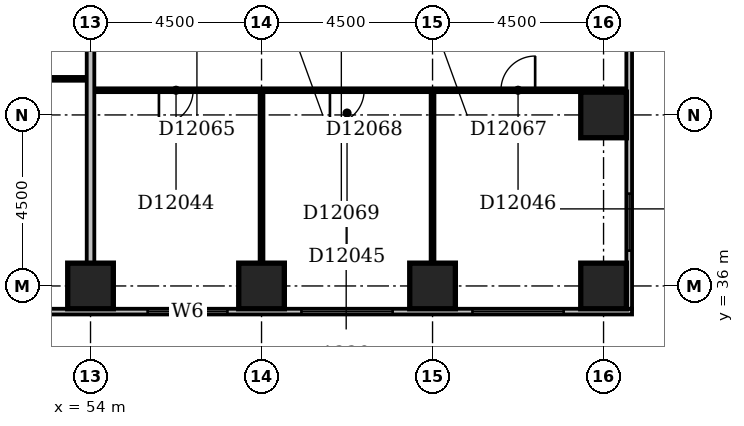
"""IFC4 building model, lengths in metres.
Left out: names, types, materials, properties, quantities, classifications, styles, units other than length and angle.
Written with IfcOpenShell. Run it as: python <this file> out.ifc"""

import sys

from ifc_helpers import new_model, si_unit, direction, frame, frame_2d, origin, origin_2d, place, context, subcontext, project, spatial, rectangle, extrude, element, fill, save


model = new_model("IFC4")
c1 = context("Model", 3, precision=1e-05, world=origin(), true_north=direction((0.0, 1.0)))
c2 = subcontext(c1, "Body", "Model", "MODEL_VIEW")
j1 = project(units=[si_unit("LENGTHUNIT", "METRE"), si_unit("PLANEANGLEUNIT", "RADIAN")], contexts=[c1])
p1 = place(None, origin())
s1 = spatial("IfcSite", under=j1, at=p1, CompositionType="ELEMENT")
p2 = place(p1, origin())
s2 = spatial("IfcBuilding", under=s1, at=p2, CompositionType="ELEMENT")
p3 = place(p2, frame((0.0, 0.0, 54.2)))
s3 = spatial("IfcBuildingStorey", under=s2, at=p3, CompositionType="ELEMENT", Elevation=54.2)
for number, where, z_axis, x_axis in (
    (1, (54.0, 36.0, -0.3), (0.0, 0.0, 1.0), (1.0, 0.0, 0.0)),
    (2, (58.5, 36.0, -0.3), (0.0, 0.0, 1.0), (1.0, 0.0, 0.0)),
    (3, (63.0, 36.0, -0.3), (0.0, 0.0, 1.0), (1.0, 0.0, 0.0)),
    (4, (67.5, 36.0, -0.3), (0.0, 0.0, 1.0), (1.0, 0.0, 0.0)),
    (5, (67.5, 40.5, -0.3), (0.0, 0.0, 1.0), (1.0, 0.0, 0.0)),
):
    element("IfcColumn", number, at=place(p3, frame(where, z_axis=z_axis, x_axis=x_axis)), inside=s3, PredefinedType="COLUMN", context=c2, shape_type="SweptSolid", body=[
        extrude(rectangle(XDim=1.2, YDim=1.2, at=origin_2d()), origin(), (0.0, 0.0, 1.0), 3.6),
    ])
p4 = place(p3, frame((23.1, 35.325, 0.0), z_axis=(0.0, 0.0, 1.0), x_axis=(1.0, 0.0, 0.0)))
e6 = element("IfcWall", 6, at=p4, inside=s3, PredefinedType="STANDARD", context=c2, shape_type="SweptSolid", body=[
    extrude(rectangle(XDim=45.15, YDim=0.15, at=frame_2d((22.575, 0.0))), origin(), (0.0, 0.0, 1.0), 2.7),
])
p5 = place(p4, frame((0.297, 0.0, 0.6)))
e7 = element("IfcOpeningElement", 7, at=p5, cuts=e6, PredefinedType="OPENING", context=c2, shape_type="SweptSolid", body=[
    extrude(rectangle(XDim=2.4, YDim=1.8, at=frame_2d((1.2, 0.9))), frame((0.0, 0.087, 0.0), z_axis=(0.0, -1.0, 0.0), x_axis=(1.0, 0.0, 0.0)), (0.0, 0.0, 1.0), 0.174),
])
p6 = place(p4, frame((4.95, 0.0, 0.6)))
e8 = element("IfcOpeningElement", 8, at=p6, cuts=e6, PredefinedType="OPENING", context=c2, shape_type="SweptSolid", body=[
    extrude(rectangle(XDim=2.4, YDim=1.8, at=frame_2d((1.2, 0.9))), frame((0.0, 0.087, 0.0), z_axis=(0.0, -1.0, 0.0), x_axis=(1.0, 0.0, 0.0)), (0.0, 0.0, 1.0), 0.174),
])
p7 = place(p4, frame((9.45, 0.0, 0.6)))
e9 = element("IfcOpeningElement", 9, at=p7, cuts=e6, PredefinedType="OPENING", context=c2, shape_type="SweptSolid", body=[
    extrude(rectangle(XDim=2.4, YDim=1.8, at=frame_2d((1.2, 0.9))), frame((0.0, 0.087, 0.0), z_axis=(0.0, -1.0, 0.0), x_axis=(1.0, 0.0, 0.0)), (0.0, 0.0, 1.0), 0.174),
])
p8 = place(p4, frame((13.95, 0.0, 0.6)))
e10 = element("IfcOpeningElement", 10, at=p8, cuts=e6, PredefinedType="OPENING", context=c2, shape_type="SweptSolid", body=[
    extrude(rectangle(XDim=2.4, YDim=1.8, at=frame_2d((1.2, 0.9))), frame((0.0, 0.087, 0.0), z_axis=(0.0, -1.0, 0.0), x_axis=(1.0, 0.0, 0.0)), (0.0, 0.0, 1.0), 0.174),
])
p9 = place(p4, frame((18.45, 0.0, 0.6)))
e11 = element("IfcOpeningElement", 11, at=p9, cuts=e6, PredefinedType="OPENING", context=c2, shape_type="SweptSolid", body=[
    extrude(rectangle(XDim=2.4, YDim=1.8, at=frame_2d((1.2, 0.9))), frame((0.0, 0.087, 0.0), z_axis=(0.0, -1.0, 0.0), x_axis=(1.0, 0.0, 0.0)), (0.0, 0.0, 1.0), 0.174),
])
p10 = place(p4, frame((23.97, 0.0, 0.6)))
e12 = element("IfcOpeningElement", 12, at=p10, cuts=e6, PredefinedType="OPENING", context=c2, shape_type="SweptSolid", body=[
    extrude(rectangle(XDim=1.5, YDim=1.8, at=frame_2d((0.75, 0.9))), frame((0.0, 0.087, 0.0), z_axis=(0.0, -1.0, 0.0), x_axis=(1.0, 0.0, 0.0)), (0.0, 0.0, 1.0), 0.174),
])
p11 = place(p4, frame((27.45, 0.0, 0.6)))
e13 = element("IfcOpeningElement", 13, at=p11, cuts=e6, PredefinedType="OPENING", context=c2, shape_type="SweptSolid", body=[
    extrude(rectangle(XDim=2.4, YDim=1.8, at=frame_2d((1.2, 0.9))), frame((0.0, 0.087, 0.0), z_axis=(0.0, -1.0, 0.0), x_axis=(1.0, 0.0, 0.0)), (0.0, 0.0, 1.0), 0.174),
])
p12 = place(p4, frame((32.403, 0.0, 0.6)))
e14 = element("IfcOpeningElement", 14, at=p12, cuts=e6, PredefinedType="OPENING", context=c2, shape_type="SweptSolid", body=[
    extrude(rectangle(XDim=2.1, YDim=1.8, at=frame_2d((1.05, 0.9))), frame((0.0, 0.087, 0.0), z_axis=(0.0, -1.0, 0.0), x_axis=(1.0, 0.0, 0.0)), (0.0, 0.0, 1.0), 0.174),
])
p13 = place(p4, frame((36.45, 0.0, 0.6)))
e15 = element("IfcOpeningElement", 15, at=p13, cuts=e6, PredefinedType="OPENING", context=c2, shape_type="SweptSolid", body=[
    extrude(rectangle(XDim=2.4, YDim=1.8, at=frame_2d((1.2, 0.9))), frame((0.0, 0.087, 0.0), z_axis=(0.0, -1.0, 0.0), x_axis=(1.0, 0.0, 0.0)), (0.0, 0.0, 1.0), 0.174),
])
p14 = place(p4, frame((40.95, 0.0, 0.6)))
e16 = element("IfcOpeningElement", 16, at=p14, cuts=e6, PredefinedType="OPENING", context=c2, shape_type="SweptSolid", body=[
    extrude(rectangle(XDim=2.4, YDim=1.8, at=frame_2d((1.2, 0.9))), frame((0.0, 0.087, 0.0), z_axis=(0.0, -1.0, 0.0), x_axis=(1.0, 0.0, 0.0)), (0.0, 0.0, 1.0), 0.174),
])
p15 = place(p3, frame((68.175, 35.4, 0.0), z_axis=(0.0, 0.0, 1.0), x_axis=(0.0, 1.0, 0.0)))
e17 = element("IfcWall", 17, at=p15, inside=s3, PredefinedType="STANDARD", context=c2, shape_type="SweptSolid", body=[
    extrude(rectangle(XDim=23.85, YDim=0.15, at=frame_2d((11.925, 0.0))), origin(), (0.0, 0.0, 1.0), 2.7),
])
p16 = place(p15, frame((1.53, 0.0, 0.6)))
e18 = element("IfcOpeningElement", 18, at=p16, cuts=e17, PredefinedType="OPENING", context=c2, shape_type="SweptSolid", body=[
    extrude(rectangle(XDim=1.5, YDim=1.8, at=frame_2d((0.75, 0.9))), frame((0.0, 0.087, 0.0), z_axis=(0.0, -1.0, 0.0), x_axis=(1.0, 0.0, 0.0)), (0.0, 0.0, 1.0), 0.174),
])
p17 = place(p15, frame((10.65, 0.0, 0.6)))
e19 = element("IfcOpeningElement", 19, at=p17, cuts=e17, PredefinedType="OPENING", context=c2, shape_type="SweptSolid", body=[
    extrude(rectangle(XDim=2.4, YDim=1.8, at=frame_2d((1.2, 0.9))), frame((0.0, 0.087, 0.0), z_axis=(0.0, -1.0, 0.0), x_axis=(1.0, 0.0, 0.0)), (0.0, 0.0, 1.0), 0.174),
])
p18 = place(p15, frame((19.47, 0.0, 0.6)))
e20 = element("IfcOpeningElement", 20, at=p18, cuts=e17, PredefinedType="OPENING", context=c2, shape_type="SweptSolid", body=[
    extrude(rectangle(XDim=0.45, YDim=1.8, at=frame_2d((0.225, 0.9))), frame((0.0, 0.087, 0.0), z_axis=(0.0, -1.0, 0.0), x_axis=(1.0, 0.0, 0.0)), (0.0, 0.0, 1.0), 0.174),
])
p19 = place(p15, frame((21.601, 0.0, 0.6)))
e21 = element("IfcOpeningElement", 21, at=p19, cuts=e17, PredefinedType="OPENING", context=c2, shape_type="SweptSolid", body=[
    extrude(rectangle(XDim=0.6, YDim=1.8, at=frame_2d((0.3, 0.9))), frame((0.0, 0.087, 0.0), z_axis=(0.0, -1.0, 0.0), x_axis=(1.0, 0.0, 0.0)), (0.0, 0.0, 1.0), 0.174),
])
p20 = place(p3, frame((54.0, 36.6, 0.0), z_axis=(0.0, 0.0, 1.0), x_axis=(0.0, 1.0, 0.0)))
e22 = element("IfcWall", 22, at=p20, inside=s3, PredefinedType="PARTITIONING", context=c2, shape_type="SweptSolid", body=[
    extrude(rectangle(XDim=12.8, YDim=0.2, at=frame_2d((6.4, 0.0))), origin(), (0.0, 0.0, 1.0), 2.6),
])
p21 = place(p3, frame((58.5, 36.6, 0.0), z_axis=(0.0, 0.0, 1.0), x_axis=(0.0, 1.0, 0.0)))
e23 = element("IfcWall", 23, at=p21, inside=s3, PredefinedType="PARTITIONING", context=c2, shape_type="SweptSolid", body=[
    extrude(rectangle(XDim=4.5, YDim=0.1, at=frame_2d((2.25, 0.0))), origin(), (0.0, 0.0, 1.0), 3.3),
])
p22 = place(p3, frame((63.0, 36.6, 0.0), z_axis=(0.0, 0.0, 1.0), x_axis=(0.0, 1.0, 0.0)))
e24 = element("IfcWall", 24, at=p22, inside=s3, PredefinedType="PARTITIONING", context=c2, shape_type="SweptSolid", body=[
    extrude(rectangle(XDim=4.5, YDim=0.1, at=frame_2d((2.25, 0.0))), origin(), (0.0, 0.0, 1.0), 2.4),
])
p23 = place(p3, frame((54.1, 41.15, 0.0), z_axis=(0.0, 0.0, 1.0), x_axis=(1.0, 0.0, 0.0)))
e25 = element("IfcWall", 25, at=p23, inside=s3, PredefinedType="PARTITIONING", context=c2, shape_type="SweptSolid", body=[
    extrude(rectangle(XDim=14.0, YDim=0.1, at=frame_2d((7.0, 0.0))), origin(), (0.0, 0.0, 1.0), 3.3),
])
p24 = place(p23, frame((1.7, 0.0, 0.0)))
e26 = element("IfcOpeningElement", 26, at=p24, cuts=e25, PredefinedType="OPENING", context=c2, shape_type="SweptSolid", body=[
    extrude(rectangle(XDim=0.9, YDim=2.1, at=frame_2d((0.45, 1.05))), frame((0.0, 0.062, 0.0), z_axis=(0.0, -1.0, 0.0), x_axis=(1.0, 0.0, 0.0)), (0.0, 0.0, 1.0), 0.124),
])
p25 = place(p23, frame((6.2, 0.0, 0.0)))
e27 = element("IfcOpeningElement", 27, at=p25, cuts=e25, PredefinedType="OPENING", context=c2, shape_type="SweptSolid", body=[
    extrude(rectangle(XDim=0.9, YDim=2.1, at=frame_2d((0.45, 1.05))), frame((0.0, 0.062, 0.0), z_axis=(0.0, -1.0, 0.0), x_axis=(1.0, 0.0, 0.0)), (0.0, 0.0, 1.0), 0.124),
])
p26 = place(p23, frame((10.7, 0.0, 0.0)))
e28 = element("IfcOpeningElement", 28, at=p26, cuts=e25, PredefinedType="OPENING", context=c2, shape_type="SweptSolid", body=[
    extrude(rectangle(XDim=0.9, YDim=2.1, at=frame_2d((0.45, 1.05))), frame((0.0, 0.062, 0.0), z_axis=(0.0, -1.0, 0.0), x_axis=(1.0, 0.0, 0.0)), (0.0, 0.0, 1.0), 0.124),
])
p27 = place(p3, frame((40.6, 41.45, 0.0), z_axis=(0.0, 0.0, 1.0), x_axis=(1.0, 0.0, 0.0)))
e29 = element("IfcWall", 29, at=p27, inside=s3, PredefinedType="PARTITIONING", context=c2, shape_type="SweptSolid", body=[
    extrude(rectangle(XDim=13.3, YDim=0.1, at=frame_2d((6.65, 0.0))), origin(), (0.0, 0.0, 1.0), 3.3),
])
p28 = place(p27, frame((1.7, 0.0, 0.0)))
e30 = element("IfcOpeningElement", 30, at=p28, cuts=e29, PredefinedType="OPENING", context=c2, shape_type="SweptSolid", body=[
    extrude(rectangle(XDim=0.9, YDim=2.1, at=frame_2d((0.45, 1.05))), frame((0.0, 0.062, 0.0), z_axis=(0.0, -1.0, 0.0), x_axis=(1.0, 0.0, 0.0)), (0.0, 0.0, 1.0), 0.124),
])
p29 = place(p27, frame((6.2, 0.0, 0.0)))
e31 = element("IfcOpeningElement", 31, at=p29, cuts=e29, PredefinedType="OPENING", context=c2, shape_type="SweptSolid", body=[
    extrude(rectangle(XDim=0.9, YDim=2.1, at=frame_2d((0.45, 1.05))), frame((0.0, 0.062, 0.0), z_axis=(0.0, -1.0, 0.0), x_axis=(1.0, 0.0, 0.0)), (0.0, 0.0, 1.0), 0.124),
])
p30 = place(p27, frame((10.7, 0.0, 0.0)))
e32 = element("IfcOpeningElement", 32, at=p30, cuts=e29, PredefinedType="OPENING", context=c2, shape_type="SweptSolid", body=[
    extrude(rectangle(XDim=0.9, YDim=2.1, at=frame_2d((0.45, 1.05))), frame((0.0, 0.062, 0.0), z_axis=(0.0, -1.0, 0.0), x_axis=(1.0, 0.0, 0.0)), (0.0, 0.0, 1.0), 0.124),
])
p31 = place(p12, origin())
e33 = element("IfcWindow", 33, at=p31, inside=s3, PartitioningType="SINGLE_PANEL", PredefinedType="WINDOW", context=c2, shape_type="SweptSolid", body=[
    extrude(rectangle(XDim=2.1, YDim=1.8, at=frame_2d((1.05, 0.9))), frame((0.0, 0.03, 0.0), z_axis=(0.0, -1.0, 0.0), x_axis=(1.0, 0.0, 0.0)), (0.0, 0.0, 1.0), 0.06),
])
fill(e14, e33)
p32 = place(p13, origin())
e34 = element("IfcWindow", 34, at=p32, inside=s3, PartitioningType="SINGLE_PANEL", PredefinedType="WINDOW", context=c2, shape_type="SweptSolid", body=[
    extrude(rectangle(XDim=2.4, YDim=1.8, at=frame_2d((1.2, 0.9))), frame((0.0, 0.03, 0.0), z_axis=(0.0, -1.0, 0.0), x_axis=(1.0, 0.0, 0.0)), (0.0, 0.0, 1.0), 0.06),
])
fill(e15, e34)
p33 = place(p14, origin())
e35 = element("IfcWindow", 35, at=p33, inside=s3, PartitioningType="SINGLE_PANEL", PredefinedType="WINDOW", context=c2, shape_type="SweptSolid", body=[
    extrude(rectangle(XDim=2.4, YDim=1.8, at=frame_2d((1.2, 0.9))), frame((0.0, 0.03, 0.0), z_axis=(0.0, -1.0, 0.0), x_axis=(1.0, 0.0, 0.0)), (0.0, 0.0, 1.0), 0.06),
])
fill(e16, e35)
p34 = place(p16, origin())
e36 = element("IfcWindow", 36, at=p34, inside=s3, PartitioningType="SINGLE_PANEL", PredefinedType="WINDOW", context=c2, shape_type="SweptSolid", body=[
    extrude(rectangle(XDim=1.5, YDim=1.8, at=frame_2d((0.75, 0.9))), frame((0.0, 0.03, 0.0), z_axis=(0.0, -1.0, 0.0), x_axis=(1.0, 0.0, 0.0)), (0.0, 0.0, 1.0), 0.06),
])
fill(e18, e36)
p35 = place(p24, frame((0.9, 0.0, 0.0), z_axis=(0.0, 0.0, 1.0), x_axis=(-1.0, 0.0, 0.0)))
e37 = element("IfcDoor", 37, at=p35, inside=s3, OperationType="SINGLE_SWING_RIGHT", PredefinedType="DOOR", context=c2, shape_type="SweptSolid", body=[
    extrude(rectangle(XDim=0.9, YDim=2.1, at=frame_2d((0.45, 1.05))), frame((0.0, 0.025, 0.0), z_axis=(0.0, -1.0, 0.0), x_axis=(1.0, 0.0, 0.0)), (0.0, 0.0, 1.0), 0.05),
])
fill(e26, e37)
p36 = place(p25, frame((0.9, 0.0, 0.0), z_axis=(0.0, 0.0, 1.0), x_axis=(-1.0, 0.0, 0.0)))
e38 = element("IfcDoor", 38, at=p36, inside=s3, OperationType="SINGLE_SWING_RIGHT", PredefinedType="DOOR", context=c2, shape_type="SweptSolid", body=[
    extrude(rectangle(XDim=0.9, YDim=2.1, at=frame_2d((0.45, 1.05))), frame((0.0, 0.025, 0.0), z_axis=(0.0, -1.0, 0.0), x_axis=(1.0, 0.0, 0.0)), (0.0, 0.0, 1.0), 0.05),
])
fill(e27, e38)
p37 = place(p26, frame((0.9, 0.0, 0.0), z_axis=(0.0, 0.0, 1.0), x_axis=(-1.0, 0.0, 0.0)))
e39 = element("IfcDoor", 39, at=p37, inside=s3, OperationType="SINGLE_SWING_LEFT", PredefinedType="DOOR", context=c2, shape_type="SweptSolid", body=[
    extrude(rectangle(XDim=0.9, YDim=2.1, at=frame_2d((0.45, 1.05))), frame((0.0, 0.025, 0.0), z_axis=(0.0, -1.0, 0.0), x_axis=(1.0, 0.0, 0.0)), (0.0, 0.0, 1.0), 0.05),
])
fill(e28, e39)
save(model, sys.argv[1])
